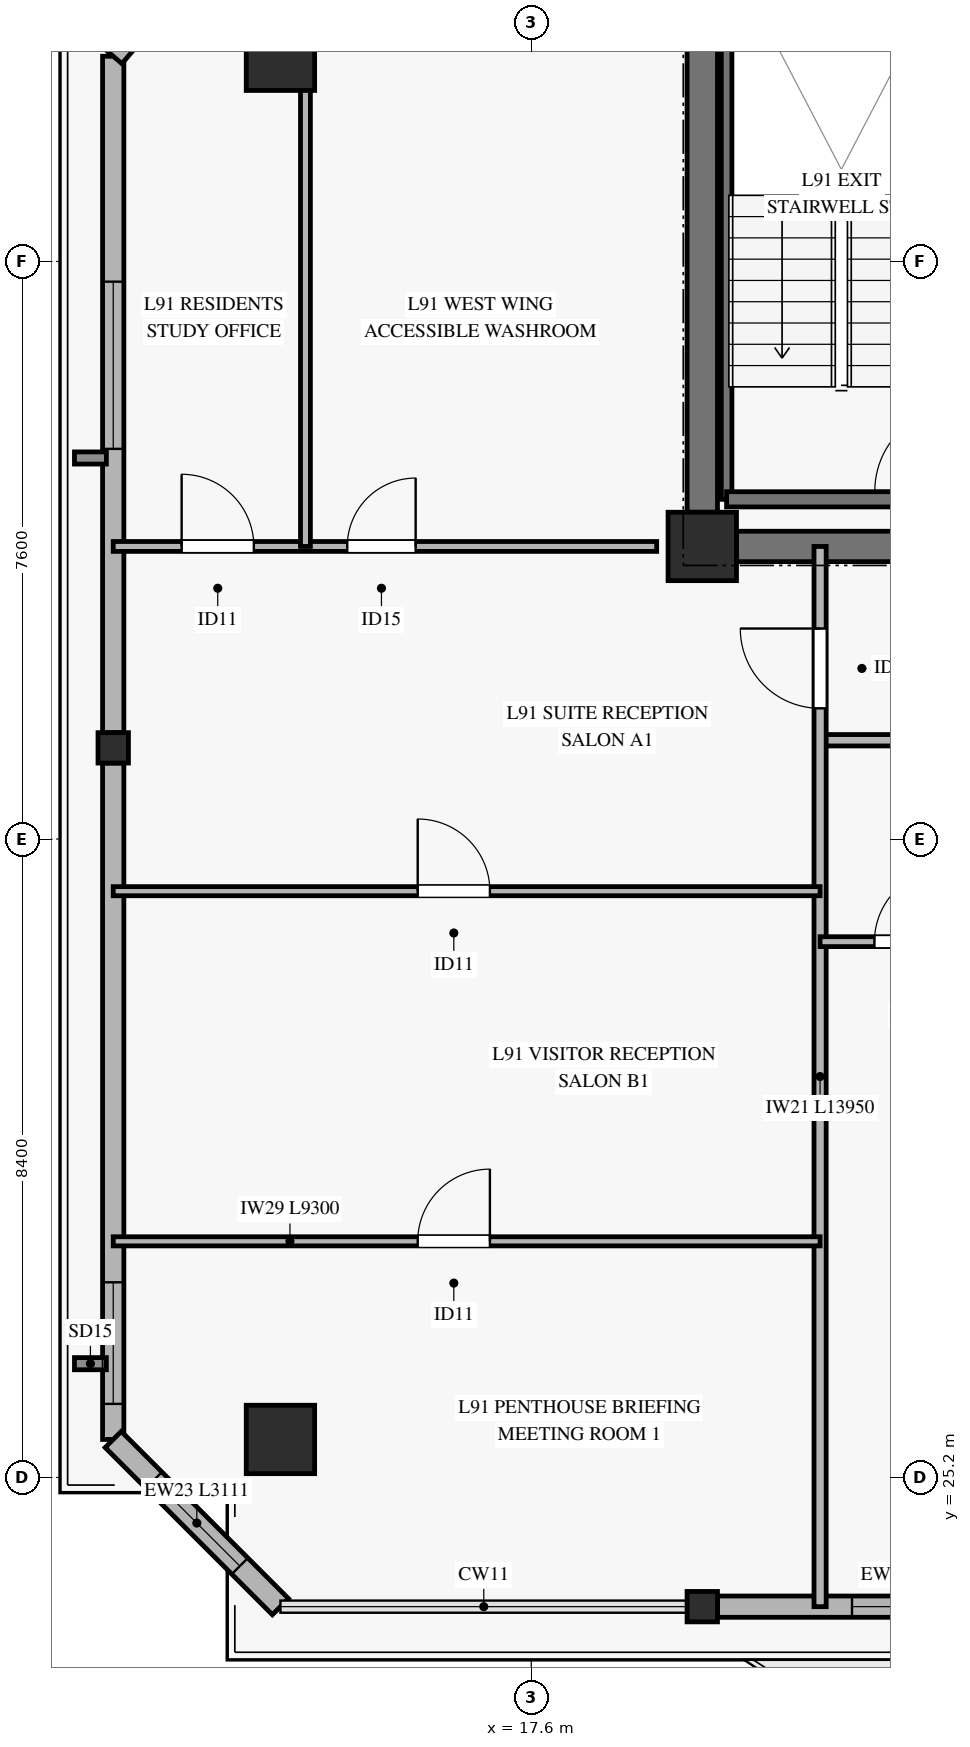
"""IFC4 building model, lengths in metres.
Left out: names, types, materials, properties, quantities, classifications, styles, units other than length and angle.
Written with IfcOpenShell. Run it as: python <this file> out.ifc"""

import sys

from ifc_helpers import new_model, si_unit, direction, frame, frame_2d, origin, origin_2d, place, context, subcontext, project, spatial, rectangle, hollow_rectangle, extrude, source, transform, mapped, element, fill, save


model = new_model("IFC4")
c1 = context("Model", 3, precision=1e-05, world=origin(), true_north=direction((0.0, 1.0)))
c2 = subcontext(c1, "Body", "Model", "MODEL_VIEW")
j1 = project(units=[si_unit("LENGTHUNIT", "METRE"), si_unit("PLANEANGLEUNIT", "RADIAN")], contexts=[c1])
p1 = place(None, origin())
s1 = spatial("IfcSite", under=j1, at=p1, CompositionType="ELEMENT")
p2 = place(p1, origin())
s2 = spatial("IfcBuilding", under=s1, at=p2, CompositionType="ELEMENT")
p3 = place(p2, frame((0.0, 0.0, 349.3)))
s3 = spatial("IfcBuildingStorey", under=s2, at=p3, CompositionType="ELEMENT", Elevation=349.3)
m1 = source(origin(), c2, "Body", "SweptSolid", [
    extrude(rectangle(XDim=0.9, YDim=0.9, at=origin_2d()), origin(), (0.0, 0.0, 1.0), 3.08),
])
p4 = place(p3, frame((19.85, 37.45, 0.0), z_axis=(0.0, 0.0, 1.0), x_axis=(1.0, 0.0, 0.0)))
e1 = element("IfcColumn", 1, at=p4, inside=s3, PredefinedType="PILASTER", context=c2, shape_type="MappedRepresentation", body=[
    mapped(m1, transform((0.0, 0.0, 0.0), x_axis=(1.0, 0.0, 0.0), y_axis=(0.0, 1.0, 0.0), z_axis=(0.0, 0.0, 1.0), scale=1.0)),
])
p5 = place(p3, frame((20.3, 37.45, 0.0), z_axis=(0.0, 0.0, 1.0), x_axis=(1.0, 0.0, 0.0)))
e2 = element("IfcWall", 2, at=p5, inside=s3, PredefinedType="SHEAR", context=c2, shape_type="SweptSolid", body=[
    extrude(rectangle(XDim=10.05, YDim=0.4, at=frame_2d((5.025, 0.0))), origin(), (0.0, 0.0, 1.0), 3.08),
])
p6 = place(p5, frame((4.25, 0.0, 0.0)))
e3 = element("IfcOpeningElement", 3, at=p6, cuts=e2, PredefinedType="OPENING", context=c2, shape_type="SweptSolid", body=[
    extrude(rectangle(XDim=1.2, YDim=2.15, at=frame_2d((0.6, 1.075))), frame((0.0, 0.21, 0.0), z_axis=(0.0, -1.0, 0.0), x_axis=(1.0, 0.0, 0.0)), (0.0, 0.0, 1.0), 0.42),
])
p7 = place(p3, frame((19.85, 37.9, 0.0), z_axis=(0.0, 0.0, 1.0), x_axis=(0.0, 1.0, 0.0)))
e4 = element("IfcWall", 4, at=p7, inside=s3, PredefinedType="SHEAR", context=c2, shape_type="SweptSolid", body=[
    extrude(rectangle(XDim=8.2, YDim=0.4, at=frame_2d((4.1, 0.0))), origin(), (0.0, 0.0, 1.0), 3.08),
])
m2 = source(origin(), c2, "Body", "SweptSolid", [
    extrude(hollow_rectangle(XDim=0.9, YDim=0.9, WallThickness=0.04, at=origin_2d()), origin(), (0.0, 0.0, 1.0), 3.08),
])
for number, where, z_axis, x_axis in (
    (5, (14.3, 25.7, 0.0), (0.0, 0.0, 1.0), (1.0, 0.0, 0.0)),
    (6, (14.3, 43.9, 0.0), (0.0, 0.0, 1.0), (1.0, 0.0, 0.0)),
):
    element("IfcColumn", number, at=place(p3, frame(where, z_axis=z_axis, x_axis=x_axis)), inside=s3, PredefinedType="COLUMN", context=c2, shape_type="MappedRepresentation", body=[
        mapped(m2, transform((0.0, 0.0, 0.0), x_axis=(1.0, 0.0, 0.0), y_axis=(0.0, 1.0, 0.0), z_axis=(0.0, 0.0, 1.0), scale=1.0)),
    ])
m3 = source(origin(), c2, "Body", "SweptSolid", [
    extrude(hollow_rectangle(XDim=0.4, YDim=0.4, WallThickness=0.02, at=origin_2d()), origin(), (0.0, 0.0, 1.0), 3.08),
])
for number, where, z_axis, x_axis in (
    (7, (19.85, 23.5, 0.0), (0.0, 0.0, 1.0), (1.0, 0.0, 0.0)),
    (8, (12.1, 34.8, 0.0), (0.0, 0.0, 1.0), (1.0, 0.0, 0.0)),
):
    element("IfcColumn", number, at=place(p3, frame(where, z_axis=z_axis, x_axis=x_axis)), inside=s3, PredefinedType="COLUMN", context=c2, shape_type="MappedRepresentation", body=[
        mapped(m3, transform((0.0, 0.0, 0.0), x_axis=(1.0, 0.0, 0.0), y_axis=(0.0, 1.0, 0.0), z_axis=(0.0, 0.0, 1.0), scale=1.0)),
    ])
p8 = place(p3, frame((20.05, 23.5, 0.0), z_axis=(0.0, 0.0, 1.0), x_axis=(1.0, 0.0, 0.0)))
e9 = element("IfcWall", 9, at=p8, inside=s3, PredefinedType="SOLIDWALL", context=c2, shape_type="SweptSolid", body=[
    extrude(rectangle(XDim=10.55, YDim=0.28, at=frame_2d((5.275, 0.0))), origin(), (0.0, 0.0, 1.0), 2.71),
])
p9 = place(p8, frame((4.35, 0.0, 0.0)))
e10 = element("IfcOpeningElement", 10, at=p9, cuts=e9, PredefinedType="OPENING", context=c2, shape_type="SweptSolid", body=[
    extrude(rectangle(XDim=1.8, YDim=2.25, at=frame_2d((0.9, 1.125))), frame((0.0, 0.15, 0.0), z_axis=(0.0, -1.0, 0.0), x_axis=(1.0, 0.0, 0.0)), (0.0, 0.0, 1.0), 0.3),
])
p10 = place(p8, frame((1.77, 0.0, 0.35)))
e11 = element("IfcOpeningElement", 11, at=p10, cuts=e9, PredefinedType="OPENING", context=c2, shape_type="SweptSolid", body=[
    extrude(rectangle(XDim=2.2, YDim=2.1, at=frame_2d((1.1, 1.05))), frame((0.0, 0.15, 0.0), z_axis=(0.0, -1.0, 0.0), x_axis=(1.0, 0.0, 0.0)), (0.0, 0.0, 1.0), 0.3),
])
p11 = place(p8, frame((7.35, 0.0, 0.35)))
e12 = element("IfcOpeningElement", 12, at=p11, cuts=e9, PredefinedType="OPENING", context=c2, shape_type="SweptSolid", body=[
    extrude(rectangle(XDim=1.6, YDim=2.0, at=frame_2d((0.8, 1.0))), frame((0.0, 0.15, 0.0), z_axis=(0.0, -1.0, 0.0), x_axis=(1.0, 0.0, 0.0)), (0.0, 0.0, 1.0), 0.3),
])
p12 = place(p3, frame((12.1, 25.7, 0.0), z_axis=(0.0, 0.0, 1.0), x_axis=(0.0, 1.0, 0.0)))
e13 = element("IfcWall", 13, at=p12, inside=s3, PredefinedType="SOLIDWALL", context=c2, shape_type="SweptSolid", body=[
    extrude(rectangle(XDim=8.9, YDim=0.28, at=frame_2d((4.45, 0.0))), origin(), (0.0, 0.0, 1.0), 2.71),
])
p13 = place(p12, frame((0.468, 0.0, 0.35)))
e14 = element("IfcOpeningElement", 14, at=p13, cuts=e13, PredefinedType="OPENING", context=c2, shape_type="SweptSolid", body=[
    extrude(rectangle(XDim=1.6, YDim=2.0, at=frame_2d((0.8, 1.0))), frame((0.0, 0.15, 0.0), z_axis=(0.0, -1.0, 0.0), x_axis=(1.0, 0.0, 0.0)), (0.0, 0.0, 1.0), 0.3),
])
p14 = place(p3, frame((12.1, 35.0, 0.0), z_axis=(0.0, 0.0, 1.0), x_axis=(0.0, 1.0, 0.0)))
e15 = element("IfcWall", 15, at=p14, inside=s3, PredefinedType="SOLIDWALL", context=c2, shape_type="SweptSolid", body=[
    extrude(rectangle(XDim=8.9, YDim=0.28, at=frame_2d((4.45, 0.0))), origin(), (0.0, 0.0, 1.0), 2.71),
])
p15 = place(p14, frame((3.734, 0.0, 0.35)))
e16 = element("IfcOpeningElement", 16, at=p15, cuts=e15, PredefinedType="OPENING", context=c2, shape_type="SweptSolid", body=[
    extrude(rectangle(XDim=2.2, YDim=2.1, at=frame_2d((1.1, 1.05))), frame((0.0, 0.15, 0.0), z_axis=(0.0, -1.0, 0.0), x_axis=(1.0, 0.0, 0.0)), (0.0, 0.0, 1.0), 0.3),
])
p16 = place(p3, frame((12.1, 25.7, 0.0), z_axis=(0.0, 0.0, 1.0), x_axis=(0.707106781187, -0.707106781187, 0.0)))
e17 = element("IfcWall", 17, at=p16, inside=s3, PredefinedType="SOLIDWALL", context=c2, shape_type="SweptSolid", body=[
    extrude(rectangle(XDim=3.111, YDim=0.3, at=frame_2d((1.556, 0.0))), origin(), (0.0, 0.0, 1.0), 2.71),
])
p17 = place(p16, frame((0.756, 0.0, 0.45)))
e18 = element("IfcOpeningElement", 18, at=p17, cuts=e17, PredefinedType="OPENING", context=c2, shape_type="SweptSolid", body=[
    extrude(rectangle(XDim=1.6, YDim=2.0, at=frame_2d((0.8, 1.0))), frame((0.0, 0.16, 0.0), z_axis=(0.0, -1.0, 0.0), x_axis=(1.0, 0.0, 0.0)), (0.0, 0.0, 1.0), 0.32),
])
p18 = place(p3, frame((14.1, 46.25, 0.0), z_axis=(0.0, 0.0, 1.0), x_axis=(-0.648103010114, -0.761552682538, 0.0)))
e19 = element("IfcWall", 19, at=p18, inside=s3, PredefinedType="SOLIDWALL", context=c2, shape_type="SweptSolid", body=[
    extrude(rectangle(XDim=3.086, YDim=0.3, at=frame_2d((1.543, 0.0))), origin(), (0.0, 0.0, 1.0), 2.71),
])
p19 = place(p18, frame((0.743, 0.0, 0.45)))
e20 = element("IfcOpeningElement", 20, at=p19, cuts=e19, PredefinedType="OPENING", context=c2, shape_type="SweptSolid", body=[
    extrude(rectangle(XDim=1.6, YDim=2.0, at=frame_2d((0.8, 1.0))), frame((0.0, 0.16, 0.0), z_axis=(0.0, -1.0, 0.0), x_axis=(1.0, 0.0, 0.0)), (0.0, 0.0, 1.0), 0.32),
])
p20 = place(p3, frame((20.17, 38.07, 0.0), z_axis=(0.0, 0.0, 1.0), x_axis=(0.0, 1.0, 0.0)))
e21 = element("IfcWall", 21, at=p20, inside=s3, PredefinedType="SOLIDWALL", context=c2, shape_type="SweptSolid", body=[
    extrude(rectangle(XDim=7.25, YDim=0.14, at=frame_2d((3.625, 0.0))), origin(), (0.0, 0.0, 1.0), 3.4),
])
p21 = place(p3, frame((20.17, 38.07, 0.0), z_axis=(0.0, 0.0, 1.0), x_axis=(1.0, 0.0, 0.0)))
e22 = element("IfcWall", 22, at=p21, inside=s3, PredefinedType="SOLIDWALL", context=c2, shape_type="SweptSolid", body=[
    extrude(rectangle(XDim=3.05, YDim=0.2, at=frame_2d((1.525, 0.0))), origin(), (0.0, 0.0, 1.0), 3.4),
])
p22 = place(p3, frame((21.4, 34.9, 0.0), z_axis=(0.0, 0.0, 1.0), x_axis=(1.0, 0.0, 0.0)))
e23 = element("IfcWall", 23, at=p22, inside=s3, PredefinedType="PARTITIONING", context=c2, shape_type="SweptSolid", body=[
    extrude(rectangle(XDim=22.9, YDim=0.15, at=frame_2d((11.45, 0.0))), origin(), (0.0, 0.0, 1.0), 2.365),
])
p23 = place(p22, frame((3.775, 0.0, 0.0)))
e24 = element("IfcOpeningElement", 24, at=p23, cuts=e23, PredefinedType="OPENING", context=c2, shape_type="SweptSolid", body=[
    extrude(rectangle(XDim=1.05, YDim=2.15, at=frame_2d((0.525, 1.075))), frame((0.0, 0.085, 0.0), z_axis=(0.0, -1.0, 0.0), x_axis=(1.0, 0.0, 0.0)), (0.0, 0.0, 1.0), 0.17),
])
p24 = place(p22, frame((12.375, 0.0, 0.0)))
e25 = element("IfcOpeningElement", 25, at=p24, cuts=e23, PredefinedType="OPENING", context=c2, shape_type="SweptSolid", body=[
    extrude(rectangle(XDim=1.05, YDim=2.15, at=frame_2d((0.525, 1.075))), frame((0.0, 0.085, 0.0), z_axis=(0.0, -1.0, 0.0), x_axis=(1.0, 0.0, 0.0)), (0.0, 0.0, 1.0), 0.17),
])
p25 = place(p22, frame((19.535, 0.0, 0.0)))
e26 = element("IfcOpeningElement", 26, at=p25, cuts=e23, PredefinedType="OPENING", context=c2, shape_type="SweptSolid", body=[
    extrude(rectangle(XDim=1.05, YDim=2.15, at=frame_2d((0.525, 1.075))), frame((0.0, 0.085, 0.0), z_axis=(0.0, -1.0, 0.0), x_axis=(1.0, 0.0, 0.0)), (0.0, 0.0, 1.0), 0.17),
])
p26 = place(p3, frame((21.4, 23.5, 0.0), z_axis=(0.0, 0.0, 1.0), x_axis=(0.0, 1.0, 0.0)))
e27 = element("IfcWall", 27, at=p26, inside=s3, PredefinedType="PARTITIONING", context=c2, shape_type="SweptSolid", body=[
    extrude(rectangle(XDim=13.95, YDim=0.16, at=frame_2d((6.975, 0.0))), origin(), (0.0, 0.0, 1.0), 2.665),
])
p27 = place(p26, frame((11.82, 0.0, 0.0)))
e28 = element("IfcOpeningElement", 28, at=p27, cuts=e27, PredefinedType="OPENING", context=c2, shape_type="SweptSolid", body=[
    extrude(rectangle(XDim=1.05, YDim=2.15, at=frame_2d((0.525, 1.075))), frame((0.0, 0.09, 0.0), z_axis=(0.0, -1.0, 0.0), x_axis=(1.0, 0.0, 0.0)), (0.0, 0.0, 1.0), 0.18),
])
p28 = place(p3, frame((12.1, 28.307, 0.0), z_axis=(0.0, 0.0, 1.0), x_axis=(1.0, 0.0, 0.0)))
e29 = element("IfcWall", 29, at=p28, inside=s3, PredefinedType="PARTITIONING", context=c2, shape_type="SweptSolid", body=[
    extrude(rectangle(XDim=9.3, YDim=0.12, at=frame_2d((4.65, 0.0))), origin(), (0.0, 0.0, 1.0), 2.365),
])
p29 = place(p28, frame((4.006, 0.0, 0.0)))
e30 = element("IfcOpeningElement", 30, at=p29, cuts=e29, PredefinedType="OPENING", context=c2, shape_type="SweptSolid", body=[
    extrude(rectangle(XDim=0.95, YDim=2.1, at=frame_2d((0.475, 1.05))), frame((0.0, 0.07, 0.0), z_axis=(0.0, -1.0, 0.0), x_axis=(1.0, 0.0, 0.0)), (0.0, 0.0, 1.0), 0.14),
])
p30 = place(p3, frame((12.1, 32.914, 0.0), z_axis=(0.0, 0.0, 1.0), x_axis=(1.0, 0.0, 0.0)))
e31 = element("IfcWall", 31, at=p30, inside=s3, PredefinedType="PARTITIONING", context=c2, shape_type="SweptSolid", body=[
    extrude(rectangle(XDim=9.3, YDim=0.12, at=frame_2d((4.65, 0.0))), origin(), (0.0, 0.0, 1.0), 2.365),
])
p31 = place(p30, frame((4.006, 0.0, 0.0)))
e32 = element("IfcOpeningElement", 32, at=p31, cuts=e31, PredefinedType="OPENING", context=c2, shape_type="SweptSolid", body=[
    extrude(rectangle(XDim=0.95, YDim=2.1, at=frame_2d((0.475, 1.05))), frame((0.0, 0.07, 0.0), z_axis=(0.0, -1.0, 0.0), x_axis=(1.0, 0.0, 0.0)), (0.0, 0.0, 1.0), 0.14),
])
p32 = place(p3, frame((21.4, 32.25, 0.0), z_axis=(0.0, 0.0, 1.0), x_axis=(1.0, 0.0, 0.0)))
e33 = element("IfcWall", 33, at=p32, inside=s3, PredefinedType="PARTITIONING", context=c2, shape_type="SweptSolid", body=[
    extrude(rectangle(XDim=2.14, YDim=0.13, at=frame_2d((1.07, 0.0))), origin(), (0.0, 0.0, 1.0), 3.08),
])
p33 = place(p32, frame((0.715, 0.0, 0.0)))
e34 = element("IfcOpeningElement", 34, at=p33, cuts=e33, PredefinedType="OPENING", context=c2, shape_type="SweptSolid", body=[
    extrude(rectangle(XDim=0.95, YDim=2.1, at=frame_2d((0.475, 1.05))), frame((0.0, 0.075, 0.0), z_axis=(0.0, -1.0, 0.0), x_axis=(1.0, 0.0, 0.0)), (0.0, 0.0, 1.0), 0.15),
])
p34 = place(p3, frame((12.1, 37.45, 0.0), z_axis=(0.0, 0.0, 1.0), x_axis=(1.0, 0.0, 0.0)))
e35 = element("IfcWall", 35, at=p34, inside=s3, PredefinedType="PARTITIONING", context=c2, shape_type="SweptSolid", body=[
    extrude(rectangle(XDim=7.15, YDim=0.13, at=frame_2d((3.575, 0.0))), origin(), (0.0, 0.0, 1.0), 2.715),
])
p35 = place(p34, frame((0.9, 0.0, 0.0)))
e36 = element("IfcOpeningElement", 36, at=p35, cuts=e35, PredefinedType="OPENING", context=c2, shape_type="SweptSolid", body=[
    extrude(rectangle(XDim=0.95, YDim=2.1, at=frame_2d((0.475, 1.05))), frame((0.0, 0.075, 0.0), z_axis=(0.0, -1.0, 0.0), x_axis=(1.0, 0.0, 0.0)), (0.0, 0.0, 1.0), 0.15),
])
p36 = place(p34, frame((3.079, 0.0, 0.0)))
e37 = element("IfcOpeningElement", 37, at=p36, cuts=e35, PredefinedType="OPENING", context=c2, shape_type="SweptSolid", body=[
    extrude(rectangle(XDim=0.9, YDim=2.1, at=frame_2d((0.45, 1.05))), frame((0.0, 0.075, 0.0), z_axis=(0.0, -1.0, 0.0), x_axis=(1.0, 0.0, 0.0)), (0.0, 0.0, 1.0), 0.15),
])
p37 = place(p3, frame((14.629, 37.45, 0.0), z_axis=(0.0, 0.0, 1.0), x_axis=(0.0, 1.0, 0.0)))
e38 = element("IfcWall", 38, at=p37, inside=s3, PredefinedType="PARTITIONING", context=c2, shape_type="SweptSolid", body=[
    extrude(rectangle(XDim=8.8, YDim=0.13, at=frame_2d((4.4, 0.0))), origin(), (0.0, 0.0, 1.0), 2.715),
])
m4 = source(origin(), c2, "Body", "SweptSolid", [
    extrude(rectangle(XDim=2.2, YDim=2.1, at=frame_2d((1.1, 1.05))), frame((0.0, 0.03, 0.0), z_axis=(0.0, -1.0, 0.0), x_axis=(1.0, 0.0, 0.0)), (0.0, 0.0, 1.0), 0.06),
])
p38 = place(p10, origin())
e39 = element("IfcWindow", 39, at=p38, inside=s3, PartitioningType="SINGLE_PANEL", PredefinedType="WINDOW", context=c2, shape_type="MappedRepresentation", body=[
    mapped(m4, transform((0.0, 0.0, 0.0), x_axis=(1.0, 0.0, 0.0), y_axis=(0.0, 1.0, 0.0), z_axis=(0.0, 0.0, 1.0), scale=1.0)),
])
fill(e11, e39)
m5 = source(origin(), c2, "Body", "SweptSolid", [
    extrude(rectangle(XDim=1.6, YDim=2.0, at=frame_2d((0.8, 1.0))), frame((0.0, 0.03, 0.0), z_axis=(0.0, -1.0, 0.0), x_axis=(1.0, 0.0, 0.0)), (0.0, 0.0, 1.0), 0.06),
])
p39 = place(p13, origin())
e40 = element("IfcWindow", 40, at=p39, inside=s3, PartitioningType="SINGLE_PANEL", PredefinedType="WINDOW", context=c2, shape_type="MappedRepresentation", body=[
    mapped(m5, transform((0.0, 0.0, 0.0), x_axis=(1.0, 0.0, 0.0), y_axis=(0.0, 1.0, 0.0), z_axis=(0.0, 0.0, 1.0), scale=1.0)),
])
fill(e14, e40)
p40 = place(p15, origin())
e41 = element("IfcWindow", 41, at=p40, inside=s3, PartitioningType="SINGLE_PANEL", PredefinedType="WINDOW", context=c2, shape_type="MappedRepresentation", body=[
    mapped(m4, transform((0.0, 0.0, 0.0), x_axis=(1.0, 0.0, 0.0), y_axis=(0.0, 1.0, 0.0), z_axis=(0.0, 0.0, 1.0), scale=1.0)),
])
fill(e16, e41)
p41 = place(p17, origin())
e42 = element("IfcWindow", 42, at=p41, inside=s3, PartitioningType="SINGLE_PANEL", PredefinedType="WINDOW", context=c2, shape_type="MappedRepresentation", body=[
    mapped(m5, transform((0.0, 0.0, 0.0), x_axis=(1.0, 0.0, 0.0), y_axis=(0.0, 1.0, 0.0), z_axis=(0.0, 0.0, 1.0), scale=1.0)),
])
fill(e18, e42)
m6 = source(origin(), c2, "Body", "SweptSolid", [
    extrude(rectangle(XDim=1.05, YDim=2.15, at=frame_2d((0.525, 1.075))), frame((0.0, 0.025, 0.0), z_axis=(0.0, -1.0, 0.0), x_axis=(1.0, 0.0, 0.0)), (0.0, 0.0, 1.0), 0.05),
])
p42 = place(p27, origin())
e43 = element("IfcDoor", 43, at=p42, inside=s3, OperationType="SINGLE_SWING_RIGHT", PredefinedType="DOOR", context=c2, shape_type="MappedRepresentation", body=[
    mapped(m6, transform((0.0, 0.0, 0.0), x_axis=(1.0, 0.0, 0.0), y_axis=(0.0, 1.0, 0.0), z_axis=(0.0, 0.0, 1.0), scale=1.0)),
])
fill(e28, e43)
m7 = source(origin(), c2, "Body", "SweptSolid", [
    extrude(rectangle(XDim=0.95, YDim=2.1, at=frame_2d((0.475, 1.05))), frame((0.0, 0.025, 0.0), z_axis=(0.0, -1.0, 0.0), x_axis=(1.0, 0.0, 0.0)), (0.0, 0.0, 1.0), 0.05),
])
p43 = place(p31, origin())
e44 = element("IfcDoor", 44, at=p43, inside=s3, OperationType="SINGLE_SWING_LEFT", PredefinedType="DOOR", context=c2, shape_type="MappedRepresentation", body=[
    mapped(m7, transform((0.0, 0.0, 0.0), x_axis=(1.0, 0.0, 0.0), y_axis=(0.0, 1.0, 0.0), z_axis=(0.0, 0.0, 1.0), scale=1.0)),
])
fill(e32, e44)
p44 = place(p29, origin())
e45 = element("IfcDoor", 45, at=p44, inside=s3, OperationType="SINGLE_SWING_RIGHT", PredefinedType="DOOR", context=c2, shape_type="MappedRepresentation", body=[
    mapped(m7, transform((0.0, 0.0, 0.0), x_axis=(1.0, 0.0, 0.0), y_axis=(0.0, 1.0, 0.0), z_axis=(0.0, 0.0, 1.0), scale=1.0)),
])
fill(e30, e45)
p45 = place(p33, origin())
e46 = element("IfcDoor", 46, at=p45, inside=s3, OperationType="SINGLE_SWING_RIGHT", PredefinedType="DOOR", context=c2, shape_type="MappedRepresentation", body=[
    mapped(m7, transform((0.0, 0.0, 0.0), x_axis=(1.0, 0.0, 0.0), y_axis=(0.0, 1.0, 0.0), z_axis=(0.0, 0.0, 1.0), scale=1.0)),
])
fill(e34, e46)
p46 = place(p35, origin())
e47 = element("IfcDoor", 47, at=p46, inside=s3, OperationType="SINGLE_SWING_LEFT", PredefinedType="DOOR", context=c2, shape_type="MappedRepresentation", body=[
    mapped(m7, transform((0.0, 0.0, 0.0), x_axis=(1.0, 0.0, 0.0), y_axis=(0.0, 1.0, 0.0), z_axis=(0.0, 0.0, 1.0), scale=1.0)),
])
fill(e36, e47)
m8 = source(origin(), c2, "Body", "SweptSolid", [
    extrude(rectangle(XDim=0.9, YDim=2.1, at=frame_2d((0.45, 1.05))), frame((0.0, 0.025, 0.0), z_axis=(0.0, -1.0, 0.0), x_axis=(1.0, 0.0, 0.0)), (0.0, 0.0, 1.0), 0.05),
])
p47 = place(p36, origin())
e48 = element("IfcDoor", 48, at=p47, inside=s3, OperationType="SINGLE_SWING_RIGHT", PredefinedType="DOOR", context=c2, shape_type="MappedRepresentation", body=[
    mapped(m8, transform((0.0, 0.0, 0.0), x_axis=(1.0, 0.0, 0.0), y_axis=(0.0, 1.0, 0.0), z_axis=(0.0, 0.0, 1.0), scale=1.0)),
])
fill(e37, e48)
save(model, sys.argv[1])
